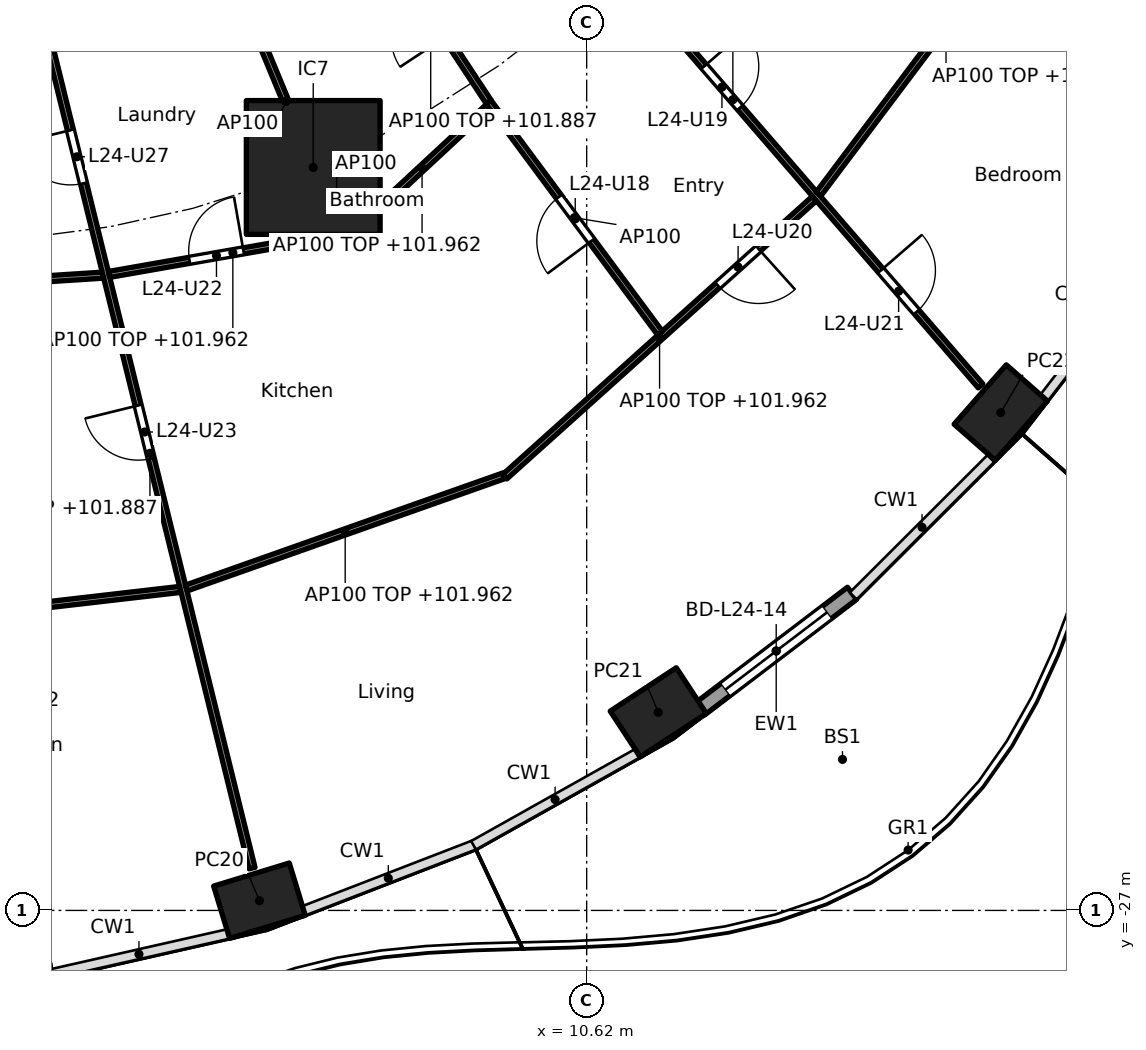
"""IFC4 building model, lengths in metres.
Left out: names, types, materials, properties, quantities, classifications, styles, units other than length and angle.
Written with IfcOpenShell. Run it as: python <this file> out.ifc"""

import sys

from ifc_helpers import new_model, si_unit, direction, frame, frame_2d, origin, origin_2d, place, context, subcontext, project, spatial, rectangle, hollow_rectangle, extrude, element, fill, save


model = new_model("IFC4")
c1 = context("Model", 3, precision=1e-05, world=origin(), true_north=direction((0.0, 1.0)))
c2 = subcontext(c1, "Body", "Model", "MODEL_VIEW")
j1 = project(units=[si_unit("LENGTHUNIT", "METRE"), si_unit("PLANEANGLEUNIT", "RADIAN")], contexts=[c1])
p1 = place(None, origin())
s1 = spatial("IfcSite", under=j1, at=p1, CompositionType="ELEMENT")
p2 = place(p1, origin())
s2 = spatial("IfcBuilding", under=s1, at=p2, CompositionType="ELEMENT")
p3 = place(p2, frame((0.0, 0.0, 99.2)))
s3 = spatial("IfcBuildingStorey", under=s2, at=p3, CompositionType="ELEMENT", Elevation=99.2)
for number, where, z_axis, x_axis in (
    (1, (5.239, -26.841, 0.0), (0.0, 0.0, 1.0), (0.957, 0.292, 0.0)),
    (2, (11.798, -23.742, 0.0), (0.0, 0.0, 1.0), (0.836, 0.549, 0.0)),
    (3, (17.43, -18.813, 0.0), (0.0, 0.0, 1.0), (0.66, 0.751, 0.0)),
):
    element("IfcColumn", number, at=place(p3, frame(where, z_axis=z_axis, x_axis=x_axis)), inside=s3, PredefinedType="COLUMN", context=c2, shape_type="SweptSolid", body=[
        extrude(hollow_rectangle(XDim=1.3, YDim=0.9, WallThickness=0.045, at=origin_2d()), origin(), (0.0, 0.0, 1.0), 3.7),
    ])
p4 = place(p3, frame((6.123, -14.782, 0.0), z_axis=(0.0, 0.0, 1.0), x_axis=(1.0, 0.0, 0.0)))
e4 = element("IfcColumn", 4, at=p4, inside=s3, PredefinedType="COLUMN", context=c2, shape_type="SweptSolid", body=[
    extrude(rectangle(XDim=2.2, YDim=2.2, at=origin_2d()), origin(), (0.0, 0.0, 1.0), 3.7),
])
p5 = place(p3, frame((14.984, -21.785, 0.0), z_axis=(0.0, 0.0, 1.0), x_axis=(-0.796037575978, -0.605247203736, 0.0)))
e5 = element("IfcWall", 5, at=p5, inside=s3, PredefinedType="SOLIDWALL", context=c2, shape_type="SweptSolid", body=[
    extrude(rectangle(XDim=3.134, YDim=0.25, at=frame_2d((1.567, 0.0))), origin(), (0.0, 0.0, 1.0), 3.44),
])
p6 = place(p5, frame((0.517, 0.0, 0.0)))
e6 = element("IfcOpeningElement", 6, at=p6, cuts=e5, PredefinedType="OPENING", context=c2, shape_type="SweptSolid", body=[
    extrude(rectangle(XDim=2.1, YDim=2.4, at=frame_2d((1.05, 1.2))), frame((0.0, 0.135, 0.0), z_axis=(0.0, -1.0, 0.0), x_axis=(1.0, 0.0, 0.0)), (0.0, 0.0, 1.0), 0.27),
])
p7 = place(p3, frame((-1.703, -16.836, 0.0), z_axis=(0.0, 0.0, 1.0), x_axis=(0.997897941075, 0.064805086209, 0.0)))
e7 = element("IfcWall", 7, at=p7, inside=s3, PredefinedType="PARTITIONING", context=c2, shape_type="SweptSolid", body=[
    extrude(rectangle(XDim=4.378, YDim=0.1, at=frame_2d((2.189, 0.0))), origin(), (0.0, 0.0, 1.0), 2.762),
])
p8 = place(p3, frame((-1.726, -22.375, 0.0), z_axis=(0.0, 0.0, 1.0), x_axis=(0.99339223329, 0.114768771187, 0.0)))
e8 = element("IfcWall", 8, at=p8, inside=s3, PredefinedType="PARTITIONING", context=c2, shape_type="SweptSolid", body=[
    extrude(rectangle(XDim=5.701, YDim=0.1, at=frame_2d((2.851, 0.0))), origin(), (0.0, 0.0, 1.0), 2.762),
])
p9 = place(p8, frame((2.4, 0.0, 0.0)))
e9 = element("IfcOpeningElement", 9, at=p9, cuts=e8, PredefinedType="OPENING", context=c2, shape_type="SweptSolid", body=[
    extrude(rectangle(XDim=0.9, YDim=2.1, at=frame_2d((0.45, 1.05))), frame((0.0, 0.06, 0.0), z_axis=(0.0, -1.0, 0.0), x_axis=(1.0, 0.0, 0.0)), (0.0, 0.0, 1.0), 0.12),
])
p10 = place(p3, frame((1.759, -12.662, 0.0), z_axis=(0.0, 0.0, 1.0), x_axis=(0.239021819854, -0.971014196412, 0.0)))
e10 = element("IfcWall", 10, at=p10, inside=s3, PredefinedType="PARTITIONING", context=c2, shape_type="SweptSolid", body=[
    extrude(rectangle(XDim=14.05, YDim=0.1, at=frame_2d((7.025, 0.0))), origin(), (0.0, 0.0, 1.0), 2.687),
])
p11 = place(p10, frame((6.214, 0.0, 0.0)))
e11 = element("IfcOpeningElement", 11, at=p11, cuts=e10, PredefinedType="OPENING", context=c2, shape_type="SweptSolid", body=[
    extrude(rectangle(XDim=0.9, YDim=2.1, at=frame_2d((0.45, 1.05))), frame((0.0, 0.06, 0.0), z_axis=(0.0, -1.0, 0.0), x_axis=(1.0, 0.0, 0.0)), (0.0, 0.0, 1.0), 0.12),
])
p12 = place(p10, frame((1.552, 0.0, 0.0)))
e12 = element("IfcOpeningElement", 12, at=p12, cuts=e10, PredefinedType="OPENING", context=c2, shape_type="SweptSolid", body=[
    extrude(rectangle(XDim=0.9, YDim=2.1, at=frame_2d((0.45, 1.05))), frame((0.0, 0.06, 0.0), z_axis=(0.0, -1.0, 0.0), x_axis=(1.0, 0.0, 0.0)), (0.0, 0.0, 1.0), 0.12),
])
p13 = place(p3, frame((2.765, -16.541, 0.0), z_axis=(0.0, 0.0, 1.0), x_axis=(0.984998612286, 0.172562260633, 0.0)))
e13 = element("IfcWall", 13, at=p13, inside=s3, PredefinedType="PARTITIONING", context=c2, shape_type="SweptSolid", body=[
    extrude(rectangle(XDim=4.134, YDim=0.1, at=frame_2d((2.067, 0.0))), origin(), (0.0, 0.0, 1.0), 2.762),
])
p14 = place(p13, frame((1.344, 0.0, 0.0)))
e14 = element("IfcOpeningElement", 14, at=p14, cuts=e13, PredefinedType="OPENING", context=c2, shape_type="SweptSolid", body=[
    extrude(rectangle(XDim=0.9, YDim=2.1, at=frame_2d((0.45, 1.05))), frame((0.0, 0.06, 0.0), z_axis=(0.0, -1.0, 0.0), x_axis=(1.0, 0.0, 0.0)), (0.0, 0.0, 1.0), 0.12),
])
p15 = place(p3, frame((4.034, -21.698, 0.0), z_axis=(0.0, 0.0, 1.0), x_axis=(0.942864271692, 0.333177077794, 0.0)))
e15 = element("IfcWall", 15, at=p15, inside=s3, PredefinedType="PARTITIONING", context=c2, shape_type="SweptSolid", body=[
    extrude(rectangle(XDim=5.545, YDim=0.1, at=frame_2d((2.772, 0.0))), origin(), (0.0, 0.0, 1.0), 2.762),
])
p16 = place(p3, frame((5.243, -12.657, 0.0), z_axis=(0.0, 0.0, 1.0), x_axis=(0.382719158442, -0.923864733477, 0.0)))
e16 = element("IfcWall", 16, at=p16, inside=s3, PredefinedType="PARTITIONING", context=c2, shape_type="SweptSolid", body=[
    extrude(rectangle(XDim=2.25, YDim=0.1, at=frame_2d((1.125, 0.0))), origin(), (0.0, 0.0, 1.0), 3.44),
])
p17 = place(p3, frame((6.824, -15.802, 0.0), z_axis=(0.0, 0.0, 1.0), x_axis=(0.733007232109, 0.680220844782, 0.0)))
e17 = element("IfcWall", 17, at=p17, inside=s3, PredefinedType="PARTITIONING", context=c2, shape_type="SweptSolid", body=[
    extrude(rectangle(XDim=2.969, YDim=0.1, at=frame_2d((1.485, 0.0))), origin(), (0.0, 0.0, 1.0), 2.762),
])
p18 = place(p3, frame((9.272, -19.868, 0.0), z_axis=(0.0, 0.0, 1.0), x_axis=(0.743884413566, 0.668308296562, 0.0)))
e18 = element("IfcWall", 18, at=p18, inside=s3, PredefinedType="PARTITIONING", context=c2, shape_type="SweptSolid", body=[
    extrude(rectangle(XDim=6.845, YDim=0.1, at=frame_2d((3.423, 0.0))), origin(), (0.0, 0.0, 1.0), 2.762),
])
p19 = place(p18, frame((4.709, 0.0, 0.0)))
e19 = element("IfcOpeningElement", 19, at=p19, cuts=e18, PredefinedType="OPENING", context=c2, shape_type="SweptSolid", body=[
    extrude(rectangle(XDim=0.9, YDim=2.1, at=frame_2d((0.45, 1.05))), frame((0.0, 0.06, 0.0), z_axis=(0.0, -1.0, 0.0), x_axis=(1.0, 0.0, 0.0)), (0.0, 0.0, 1.0), 0.12),
])
p20 = place(p3, frame((7.1, -10.808, 0.0), z_axis=(0.0, 0.0, 1.0), x_axis=(0.550294419528, -0.834970689208, 0.0)))
e20 = element("IfcWall", 20, at=p20, inside=s3, PredefinedType="PARTITIONING", context=c2, shape_type="SweptSolid", body=[
    extrude(rectangle(XDim=3.472, YDim=0.1, at=frame_2d((1.736, 0.0))), origin(), (0.0, 0.0, 1.0), 2.687),
])
p21 = place(p20, frame((1.286, 0.0, 0.0)))
e21 = element("IfcOpeningElement", 21, at=p21, cuts=e20, PredefinedType="OPENING", context=c2, shape_type="SweptSolid", body=[
    extrude(rectangle(XDim=0.9, YDim=2.1, at=frame_2d((0.45, 1.05))), frame((0.0, 0.06, 0.0), z_axis=(0.0, -1.0, 0.0), x_axis=(1.0, 0.0, 0.0)), (0.0, 0.0, 1.0), 0.12),
])
p22 = place(p3, frame((9.008, -13.708, 0.0), z_axis=(0.0, 0.0, 1.0), x_axis=(0.595845850207, -0.803098825047, 0.0)))
e22 = element("IfcWall", 22, at=p22, inside=s3, PredefinedType="PARTITIONING", context=c2, shape_type="SweptSolid", body=[
    extrude(rectangle(XDim=4.729, YDim=0.1, at=frame_2d((2.365, 0.0))), origin(), (0.0, 0.0, 1.0), 3.44),
])
p23 = place(p22, frame((1.94, 0.0, 0.0)))
e23 = element("IfcOpeningElement", 23, at=p23, cuts=e22, PredefinedType="OPENING", context=c2, shape_type="SweptSolid", body=[
    extrude(rectangle(XDim=0.9, YDim=2.1, at=frame_2d((0.45, 1.05))), frame((0.0, 0.06, 0.0), z_axis=(0.0, -1.0, 0.0), x_axis=(1.0, 0.0, 0.0)), (0.0, 0.0, 1.0), 0.12),
])
p24 = place(p3, frame((8.95, -8.96, 0.0), z_axis=(0.0, 0.0, 1.0), x_axis=(0.65441081073, -0.756139200676, 0.0)))
e24 = element("IfcWall", 24, at=p24, inside=s3, PredefinedType="PARTITIONING", context=c2, shape_type="SweptSolid", body=[
    extrude(rectangle(XDim=12.451, YDim=0.1, at=frame_2d((6.226, 0.0))), origin(), (0.0, 0.0, 1.0), 2.687),
])
p25 = place(p24, frame((1.336, 0.0, 0.0)))
e25 = element("IfcOpeningElement", 25, at=p25, cuts=e24, PredefinedType="OPENING", context=c2, shape_type="SweptSolid", body=[
    extrude(rectangle(XDim=0.9, YDim=2.1, at=frame_2d((0.45, 1.05))), frame((0.0, 0.06, 0.0), z_axis=(0.0, -1.0, 0.0), x_axis=(1.0, 0.0, 0.0)), (0.0, 0.0, 1.0), 0.12),
])
p26 = place(p24, frame((5.501, 0.0, 0.0)))
e26 = element("IfcOpeningElement", 26, at=p26, cuts=e24, PredefinedType="OPENING", context=c2, shape_type="SweptSolid", body=[
    extrude(rectangle(XDim=0.9, YDim=2.1, at=frame_2d((0.45, 1.05))), frame((0.0, 0.06, 0.0), z_axis=(0.0, -1.0, 0.0), x_axis=(1.0, 0.0, 0.0)), (0.0, 0.0, 1.0), 0.12),
])
p27 = place(p24, frame((9.941, 0.0, 0.0)))
e27 = element("IfcOpeningElement", 27, at=p27, cuts=e24, PredefinedType="OPENING", context=c2, shape_type="SweptSolid", body=[
    extrude(rectangle(XDim=0.9, YDim=2.1, at=frame_2d((0.45, 1.05))), frame((0.0, 0.06, 0.0), z_axis=(0.0, -1.0, 0.0), x_axis=(1.0, 0.0, 0.0)), (0.0, 0.0, 1.0), 0.12),
])
p28 = place(p3, frame((14.432, -15.219, 0.0), z_axis=(0.0, 0.0, 1.0), x_axis=(0.601001256685, 0.799248077548, 0.0)))
e28 = element("IfcWall", 28, at=p28, inside=s3, PredefinedType="PARTITIONING", context=c2, shape_type="SweptSolid", body=[
    extrude(rectangle(XDim=6.98, YDim=0.1, at=frame_2d((3.49, 0.0))), origin(), (0.0, 0.0, 1.0), 2.762),
])
p29 = place(p28, frame((4.798, 0.0, 0.0)))
e29 = element("IfcOpeningElement", 29, at=p29, cuts=e28, PredefinedType="OPENING", context=c2, shape_type="SweptSolid", body=[
    extrude(rectangle(XDim=0.9, YDim=2.1, at=frame_2d((0.45, 1.05))), frame((0.0, 0.06, 0.0), z_axis=(0.0, -1.0, 0.0), x_axis=(1.0, 0.0, 0.0)), (0.0, 0.0, 1.0), 0.12),
])
p30 = place(p3, frame((6.781, -15.638, 0.0), z_axis=(0.0, 0.0, 1.0), x_axis=(-0.533419461524, 0.845850860417, 0.0)))
e30 = element("IfcWall", 30, at=p30, inside=s3, PredefinedType="PARTITIONING", context=c2, shape_type="SweptSolid", body=[
    extrude(rectangle(XDim=1.025, YDim=0.1, at=frame_2d((0.513, 0.0))), origin(), (0.0, 0.0, 1.0), 3.44),
])
p31 = place(p6, origin())
e31 = element("IfcDoor", 31, at=p31, inside=s3, OperationType="SLIDING_TO_LEFT", PredefinedType="DOOR", context=c2, shape_type="SweptSolid", body=[
    extrude(rectangle(XDim=2.1, YDim=2.4, at=frame_2d((1.05, 1.2))), frame((0.0, 0.025, 0.0), z_axis=(0.0, -1.0, 0.0), x_axis=(1.0, 0.0, 0.0)), (0.0, 0.0, 1.0), 0.05),
])
fill(e6, e31)
p32 = place(p23, frame((0.9, 0.0, 0.0), x_axis=(-1.0, 0.0, 0.0)))
e32 = element("IfcDoor", 32, at=p32, inside=s3, OperationType="SINGLE_SWING_LEFT", PredefinedType="DOOR", context=c2, shape_type="SweptSolid", body=[
    extrude(rectangle(XDim=0.9, YDim=2.1, at=frame_2d((0.45, 1.05))), frame((0.0, 0.025, 0.0), z_axis=(0.0, -1.0, 0.0), x_axis=(1.0, 0.0, 0.0)), (0.0, 0.0, 1.0), 0.05),
])
fill(e23, e32)
p33 = place(p26, origin())
e33 = element("IfcDoor", 33, at=p33, inside=s3, OperationType="SINGLE_SWING_LEFT", PredefinedType="DOOR", context=c2, shape_type="SweptSolid", body=[
    extrude(rectangle(XDim=0.9, YDim=2.1, at=frame_2d((0.45, 1.05))), frame((0.0, 0.025, 0.0), z_axis=(0.0, -1.0, 0.0), x_axis=(1.0, 0.0, 0.0)), (0.0, 0.0, 1.0), 0.05),
])
fill(e26, e33)
p34 = place(p19, frame((0.9, 0.0, 0.0), x_axis=(-1.0, 0.0, 0.0)))
e34 = element("IfcDoor", 34, at=p34, inside=s3, OperationType="SINGLE_SWING_LEFT", PredefinedType="DOOR", context=c2, shape_type="SweptSolid", body=[
    extrude(rectangle(XDim=0.9, YDim=2.1, at=frame_2d((0.45, 1.05))), frame((0.0, 0.025, 0.0), z_axis=(0.0, -1.0, 0.0), x_axis=(1.0, 0.0, 0.0)), (0.0, 0.0, 1.0), 0.05),
])
fill(e19, e34)
p35 = place(p27, origin())
e35 = element("IfcDoor", 35, at=p35, inside=s3, OperationType="SINGLE_SWING_LEFT", PredefinedType="DOOR", context=c2, shape_type="SweptSolid", body=[
    extrude(rectangle(XDim=0.9, YDim=2.1, at=frame_2d((0.45, 1.05))), frame((0.0, 0.025, 0.0), z_axis=(0.0, -1.0, 0.0), x_axis=(1.0, 0.0, 0.0)), (0.0, 0.0, 1.0), 0.05),
])
fill(e27, e35)
p36 = place(p14, origin())
e36 = element("IfcDoor", 36, at=p36, inside=s3, OperationType="SINGLE_SWING_RIGHT", PredefinedType="DOOR", context=c2, shape_type="SweptSolid", body=[
    extrude(rectangle(XDim=0.9, YDim=2.1, at=frame_2d((0.45, 1.05))), frame((0.0, 0.025, 0.0), z_axis=(0.0, -1.0, 0.0), x_axis=(1.0, 0.0, 0.0)), (0.0, 0.0, 1.0), 0.05),
])
fill(e14, e36)
p37 = place(p11, frame((0.9, 0.0, 0.0), x_axis=(-1.0, 0.0, 0.0)))
e37 = element("IfcDoor", 37, at=p37, inside=s3, OperationType="SINGLE_SWING_RIGHT", PredefinedType="DOOR", context=c2, shape_type="SweptSolid", body=[
    extrude(rectangle(XDim=0.9, YDim=2.1, at=frame_2d((0.45, 1.05))), frame((0.0, 0.025, 0.0), z_axis=(0.0, -1.0, 0.0), x_axis=(1.0, 0.0, 0.0)), (0.0, 0.0, 1.0), 0.05),
])
fill(e11, e37)
p38 = place(p12, frame((0.9, 0.0, 0.0), x_axis=(-1.0, 0.0, 0.0)))
e38 = element("IfcDoor", 38, at=p38, inside=s3, OperationType="SINGLE_SWING_RIGHT", PredefinedType="DOOR", context=c2, shape_type="SweptSolid", body=[
    extrude(rectangle(XDim=0.9, YDim=2.1, at=frame_2d((0.45, 1.05))), frame((0.0, 0.025, 0.0), z_axis=(0.0, -1.0, 0.0), x_axis=(1.0, 0.0, 0.0)), (0.0, 0.0, 1.0), 0.05),
])
fill(e12, e38)
save(model, sys.argv[1])
